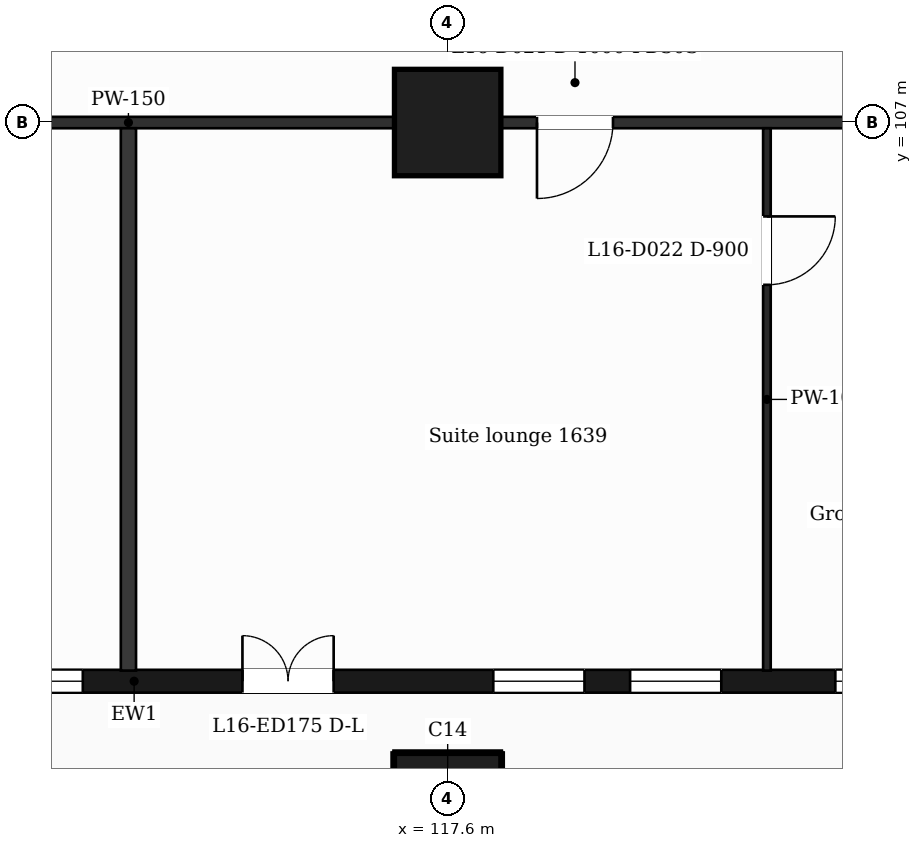
"""IFC4 building model, lengths in metres.
Left out: names, types, materials, properties, quantities, classifications, styles, units other than length and angle.
Written with IfcOpenShell. Run it as: python <this file> out.ifc"""

import sys

from ifc_helpers import new_model, si_unit, direction, frame, frame_2d, origin, origin_2d, place, context, subcontext, project, spatial, rectangle, extrude, element, fill, save


model = new_model("IFC4")
c1 = context("Model", 3, precision=1e-05, world=origin(), true_north=direction((0.0, 1.0)))
c2 = subcontext(c1, "Body", "Model", "MODEL_VIEW")
j1 = project(units=[si_unit("LENGTHUNIT", "METRE"), si_unit("PLANEANGLEUNIT", "RADIAN")], contexts=[c1])
p1 = place(None, origin())
s1 = spatial("IfcSite", under=j1, at=p1, CompositionType="ELEMENT")
p2 = place(p1, origin())
s2 = spatial("IfcBuilding", under=s1, at=p2, CompositionType="ELEMENT")
p3 = place(p2, frame((0.0, 0.0, 74.0)))
s3 = spatial("IfcBuildingStorey", under=s2, at=p3, CompositionType="ELEMENT", Elevation=74.0)
for number, where, z_axis, x_axis in (
    (1, (117.6, 98.0, 0.0), (0.0, 0.0, 1.0), (1.0, 0.0, 0.0)),
    (2, (117.6, 107.0, 0.0), (0.0, 0.0, 1.0), (1.0, 0.0, 0.0)),
):
    element("IfcColumn", number, at=place(p3, frame(where, z_axis=z_axis, x_axis=x_axis)), inside=s3, PredefinedType="COLUMN", context=c2, shape_type="SweptSolid", body=[
        extrude(rectangle(XDim=1.4, YDim=1.4, at=origin_2d()), origin(), (0.0, 0.0, 1.0), 3.5),
    ])
p4 = place(p3, frame((89.85, 99.65, 0.0), z_axis=(0.0, 0.0, 1.0), x_axis=(1.0, 0.0, 0.0)))
e3 = element("IfcWall", 3, at=p4, inside=s3, PredefinedType="SOLIDWALL", context=c2, shape_type="SweptSolid", body=[
    extrude(rectangle(XDim=47.25, YDim=0.3, at=frame_2d((23.625, 0.0))), origin(), (0.0, 0.0, 1.0), 3.18),
])
p5 = place(p4, frame((0.725, 0.0, 0.9)))
e4 = element("IfcOpeningElement", 4, at=p5, cuts=e3, PredefinedType="OPENING", context=c2, shape_type="SweptSolid", body=[
    extrude(rectangle(XDim=1.2, YDim=2.1, at=frame_2d((0.6, 1.05))), frame((0.0, 0.16, 0.0), z_axis=(0.0, -1.0, 0.0), x_axis=(1.0, 0.0, 0.0)), (0.0, 0.0, 1.0), 0.32),
])
p6 = place(p4, frame((3.45, 0.0, 0.9)))
e5 = element("IfcOpeningElement", 5, at=p6, cuts=e3, PredefinedType="OPENING", context=c2, shape_type="SweptSolid", body=[
    extrude(rectangle(XDim=2.4, YDim=2.1, at=frame_2d((1.2, 1.05))), frame((0.0, 0.16, 0.0), z_axis=(0.0, -1.0, 0.0), x_axis=(1.0, 0.0, 0.0)), (0.0, 0.0, 1.0), 0.32),
])
p7 = place(p4, frame((7.65, 0.0, 0.9)))
e6 = element("IfcOpeningElement", 6, at=p7, cuts=e3, PredefinedType="OPENING", context=c2, shape_type="SweptSolid", body=[
    extrude(rectangle(XDim=2.4, YDim=2.1, at=frame_2d((1.2, 1.05))), frame((0.0, 0.16, 0.0), z_axis=(0.0, -1.0, 0.0), x_axis=(1.0, 0.0, 0.0)), (0.0, 0.0, 1.0), 0.32),
])
p8 = place(p4, frame((12.45, 0.0, 0.9)))
e7 = element("IfcOpeningElement", 7, at=p8, cuts=e3, PredefinedType="OPENING", context=c2, shape_type="SweptSolid", body=[
    extrude(rectangle(XDim=1.2, YDim=2.1, at=frame_2d((0.6, 1.05))), frame((0.0, 0.16, 0.0), z_axis=(0.0, -1.0, 0.0), x_axis=(1.0, 0.0, 0.0)), (0.0, 0.0, 1.0), 0.32),
])
p9 = place(p4, frame((16.65, 0.0, 0.9)))
e8 = element("IfcOpeningElement", 8, at=p9, cuts=e3, PredefinedType="OPENING", context=c2, shape_type="SweptSolid", body=[
    extrude(rectangle(XDim=1.2, YDim=2.1, at=frame_2d((0.6, 1.05))), frame((0.0, 0.16, 0.0), z_axis=(0.0, -1.0, 0.0), x_axis=(1.0, 0.0, 0.0)), (0.0, 0.0, 1.0), 0.32),
])
p10 = place(p4, frame((19.95, 0.0, 0.9)))
e9 = element("IfcOpeningElement", 9, at=p10, cuts=e3, PredefinedType="OPENING", context=c2, shape_type="SweptSolid", body=[
    extrude(rectangle(XDim=1.2, YDim=2.1, at=frame_2d((0.6, 1.05))), frame((0.0, 0.16, 0.0), z_axis=(0.0, -1.0, 0.0), x_axis=(1.0, 0.0, 0.0)), (0.0, 0.0, 1.0), 0.32),
])
p11 = place(p4, frame((21.75, 0.0, 0.9)))
e10 = element("IfcOpeningElement", 10, at=p11, cuts=e3, PredefinedType="OPENING", context=c2, shape_type="SweptSolid", body=[
    extrude(rectangle(XDim=1.2, YDim=2.1, at=frame_2d((0.6, 1.05))), frame((0.0, 0.16, 0.0), z_axis=(0.0, -1.0, 0.0), x_axis=(1.0, 0.0, 0.0)), (0.0, 0.0, 1.0), 0.32),
])
p12 = place(p4, frame((25.05, 0.0, 0.0)))
e11 = element("IfcOpeningElement", 11, at=p12, cuts=e3, PredefinedType="OPENING", context=c2, shape_type="SweptSolid", body=[
    extrude(rectangle(XDim=1.2, YDim=2.4, at=frame_2d((0.6, 1.2))), frame((0.0, 0.16, 0.0), z_axis=(0.0, -1.0, 0.0), x_axis=(1.0, 0.0, 0.0)), (0.0, 0.0, 1.0), 0.32),
])
p13 = place(p4, frame((28.35, 0.0, 0.9)))
e12 = element("IfcOpeningElement", 12, at=p13, cuts=e3, PredefinedType="OPENING", context=c2, shape_type="SweptSolid", body=[
    extrude(rectangle(XDim=1.2, YDim=2.1, at=frame_2d((0.6, 1.05))), frame((0.0, 0.16, 0.0), z_axis=(0.0, -1.0, 0.0), x_axis=(1.0, 0.0, 0.0)), (0.0, 0.0, 1.0), 0.32),
])
p14 = place(p4, frame((30.15, 0.0, 0.9)))
e13 = element("IfcOpeningElement", 13, at=p14, cuts=e3, PredefinedType="OPENING", context=c2, shape_type="SweptSolid", body=[
    extrude(rectangle(XDim=1.2, YDim=2.1, at=frame_2d((0.6, 1.05))), frame((0.0, 0.16, 0.0), z_axis=(0.0, -1.0, 0.0), x_axis=(1.0, 0.0, 0.0)), (0.0, 0.0, 1.0), 0.32),
])
p15 = place(p4, frame((32.85, 0.0, 0.9)))
e14 = element("IfcOpeningElement", 14, at=p15, cuts=e3, PredefinedType="OPENING", context=c2, shape_type="SweptSolid", body=[
    extrude(rectangle(XDim=2.4, YDim=2.1, at=frame_2d((1.2, 1.05))), frame((0.0, 0.16, 0.0), z_axis=(0.0, -1.0, 0.0), x_axis=(1.0, 0.0, 0.0)), (0.0, 0.0, 1.0), 0.32),
])
p16 = place(p4, frame((37.05, 0.0, 0.9)))
e15 = element("IfcOpeningElement", 15, at=p16, cuts=e3, PredefinedType="OPENING", context=c2, shape_type="SweptSolid", body=[
    extrude(rectangle(XDim=2.4, YDim=2.1, at=frame_2d((1.2, 1.05))), frame((0.0, 0.16, 0.0), z_axis=(0.0, -1.0, 0.0), x_axis=(1.0, 0.0, 0.0)), (0.0, 0.0, 1.0), 0.32),
])
p17 = place(p4, frame((41.85, 0.0, 0.9)))
e16 = element("IfcOpeningElement", 16, at=p17, cuts=e3, PredefinedType="OPENING", context=c2, shape_type="SweptSolid", body=[
    extrude(rectangle(XDim=1.2, YDim=2.1, at=frame_2d((0.6, 1.05))), frame((0.0, 0.16, 0.0), z_axis=(0.0, -1.0, 0.0), x_axis=(1.0, 0.0, 0.0)), (0.0, 0.0, 1.0), 0.32),
])
p18 = place(p4, frame((45.25, 0.0, 0.9)))
e17 = element("IfcOpeningElement", 17, at=p18, cuts=e3, PredefinedType="OPENING", context=c2, shape_type="SweptSolid", body=[
    extrude(rectangle(XDim=1.2, YDim=2.1, at=frame_2d((0.6, 1.05))), frame((0.0, 0.16, 0.0), z_axis=(0.0, -1.0, 0.0), x_axis=(1.0, 0.0, 0.0)), (0.0, 0.0, 1.0), 0.32),
])
p19 = place(p3, frame((87.018, 107.0, 0.0), z_axis=(0.0, 0.0, 1.0), x_axis=(1.0, 0.0, 0.0)))
e18 = element("IfcWall", 18, at=p19, inside=s3, PredefinedType="PARTITIONING", context=c2, shape_type="SweptSolid", body=[
    extrude(rectangle(XDim=52.765, YDim=0.15, at=frame_2d((26.382, 0.0))), origin(), (0.0, 0.0, 1.0), 3.18),
])
p20 = place(p19, frame((1.276, 0.0, 0.0)))
e19 = element("IfcOpeningElement", 19, at=p20, cuts=e18, PredefinedType="OPENING", context=c2, shape_type="SweptSolid", body=[
    extrude(rectangle(XDim=0.95, YDim=2.1, at=frame_2d((0.475, 1.05))), frame((0.0, 0.085, 0.0), z_axis=(0.0, -1.0, 0.0), x_axis=(1.0, 0.0, 0.0)), (0.0, 0.0, 1.0), 0.17),
])
p21 = place(p19, frame((10.757, 0.0, 0.0)))
e20 = element("IfcOpeningElement", 20, at=p21, cuts=e18, PredefinedType="OPENING", context=c2, shape_type="SweptSolid", body=[
    extrude(rectangle(XDim=1.0, YDim=2.1, at=frame_2d((0.5, 1.05))), frame((0.0, 0.085, 0.0), z_axis=(0.0, -1.0, 0.0), x_axis=(1.0, 0.0, 0.0)), (0.0, 0.0, 1.0), 0.17),
])
p22 = place(p19, frame((23.125, 0.0, 0.0)))
e21 = element("IfcOpeningElement", 21, at=p22, cuts=e18, PredefinedType="OPENING", context=c2, shape_type="SweptSolid", body=[
    extrude(rectangle(XDim=0.95, YDim=2.1, at=frame_2d((0.475, 1.05))), frame((0.0, 0.085, 0.0), z_axis=(0.0, -1.0, 0.0), x_axis=(1.0, 0.0, 0.0)), (0.0, 0.0, 1.0), 0.17),
])
p23 = place(p19, frame((31.757, 0.0, 0.0)))
e22 = element("IfcOpeningElement", 22, at=p23, cuts=e18, PredefinedType="OPENING", context=c2, shape_type="SweptSolid", body=[
    extrude(rectangle(XDim=1.0, YDim=2.1, at=frame_2d((0.5, 1.05))), frame((0.0, 0.085, 0.0), z_axis=(0.0, -1.0, 0.0), x_axis=(1.0, 0.0, 0.0)), (0.0, 0.0, 1.0), 0.17),
])
p24 = place(p19, frame((42.819, 0.0, 0.0)))
e23 = element("IfcOpeningElement", 23, at=p24, cuts=e18, PredefinedType="OPENING", context=c2, shape_type="SweptSolid", body=[
    extrude(rectangle(XDim=0.95, YDim=2.1, at=frame_2d((0.475, 1.05))), frame((0.0, 0.085, 0.0), z_axis=(0.0, -1.0, 0.0), x_axis=(1.0, 0.0, 0.0)), (0.0, 0.0, 1.0), 0.17),
])
p25 = place(p19, frame((48.974, 0.0, 0.0)))
e24 = element("IfcOpeningElement", 24, at=p25, cuts=e18, PredefinedType="OPENING", context=c2, shape_type="SweptSolid", body=[
    extrude(rectangle(XDim=0.95, YDim=2.1, at=frame_2d((0.475, 1.05))), frame((0.0, 0.085, 0.0), z_axis=(0.0, -1.0, 0.0), x_axis=(1.0, 0.0, 0.0)), (0.0, 0.0, 1.0), 0.17),
])
p26 = place(p3, frame((113.4, 99.79, 0.0), z_axis=(0.0, 0.0, 1.0), x_axis=(0.0, 1.0, 0.0)))
e25 = element("IfcWall", 25, at=p26, inside=s3, PredefinedType="PARTITIONING", context=c2, shape_type="SweptSolid", body=[
    extrude(rectangle(XDim=7.135, YDim=0.2, at=frame_2d((3.567, 0.0))), origin(), (0.0, 0.0, 1.0), 3.18),
])
p27 = place(p3, frame((121.8, 99.79, 0.0), z_axis=(0.0, 0.0, 1.0), x_axis=(0.0, 1.0, 0.0)))
e26 = element("IfcWall", 26, at=p27, inside=s3, PredefinedType="PARTITIONING", context=c2, shape_type="SweptSolid", body=[
    extrude(rectangle(XDim=7.135, YDim=0.1, at=frame_2d((3.567, 0.0))), origin(), (0.0, 0.0, 1.0), 3.18),
])
p28 = place(p27, frame((5.075, 0.0, 0.0)))
e27 = element("IfcOpeningElement", 27, at=p28, cuts=e26, PredefinedType="OPENING", context=c2, shape_type="SweptSolid", body=[
    extrude(rectangle(XDim=0.9, YDim=2.1, at=frame_2d((0.45, 1.05))), frame((0.0, 0.06, 0.0), z_axis=(0.0, -1.0, 0.0), x_axis=(1.0, 0.0, 0.0)), (0.0, 0.0, 1.0), 0.12),
])
p29 = place(p11, origin())
e28 = element("IfcWindow", 28, at=p29, inside=s3, PartitioningType="SINGLE_PANEL", PredefinedType="WINDOW", context=c2, shape_type="SweptSolid", body=[
    extrude(rectangle(XDim=1.2, YDim=2.1, at=frame_2d((0.6, 1.05))), frame((0.0, 0.03, 0.0), z_axis=(0.0, -1.0, 0.0), x_axis=(1.0, 0.0, 0.0)), (0.0, 0.0, 1.0), 0.06),
])
fill(e10, e28)
p30 = place(p12, origin())
e29 = element("IfcDoor", 29, at=p30, inside=s3, OperationType="DOUBLE_DOOR_SINGLE_SWING", PredefinedType="DOOR", context=c2, shape_type="SweptSolid", body=[
    extrude(rectangle(XDim=1.2, YDim=2.4, at=frame_2d((0.6, 1.2))), frame((0.0, 0.025, 0.0), z_axis=(0.0, -1.0, 0.0), x_axis=(1.0, 0.0, 0.0)), (0.0, 0.0, 1.0), 0.05),
])
fill(e11, e29)
p31 = place(p13, origin())
e30 = element("IfcWindow", 30, at=p31, inside=s3, PartitioningType="SINGLE_PANEL", PredefinedType="WINDOW", context=c2, shape_type="SweptSolid", body=[
    extrude(rectangle(XDim=1.2, YDim=2.1, at=frame_2d((0.6, 1.05))), frame((0.0, 0.03, 0.0), z_axis=(0.0, -1.0, 0.0), x_axis=(1.0, 0.0, 0.0)), (0.0, 0.0, 1.0), 0.06),
])
fill(e12, e30)
p32 = place(p14, origin())
e31 = element("IfcWindow", 31, at=p32, inside=s3, PartitioningType="SINGLE_PANEL", PredefinedType="WINDOW", context=c2, shape_type="SweptSolid", body=[
    extrude(rectangle(XDim=1.2, YDim=2.1, at=frame_2d((0.6, 1.05))), frame((0.0, 0.03, 0.0), z_axis=(0.0, -1.0, 0.0), x_axis=(1.0, 0.0, 0.0)), (0.0, 0.0, 1.0), 0.06),
])
fill(e13, e31)
p33 = place(p15, origin())
e32 = element("IfcWindow", 32, at=p33, inside=s3, PartitioningType="SINGLE_PANEL", PredefinedType="WINDOW", context=c2, shape_type="SweptSolid", body=[
    extrude(rectangle(XDim=2.4, YDim=2.1, at=frame_2d((1.2, 1.05))), frame((0.0, 0.03, 0.0), z_axis=(0.0, -1.0, 0.0), x_axis=(1.0, 0.0, 0.0)), (0.0, 0.0, 1.0), 0.06),
])
fill(e14, e32)
p34 = place(p23, origin())
e33 = element("IfcDoor", 33, at=p34, inside=s3, OperationType="SINGLE_SWING_LEFT", PredefinedType="DOOR", context=c2, shape_type="SweptSolid", body=[
    extrude(rectangle(XDim=1.0, YDim=2.1, at=frame_2d((0.5, 1.05))), frame((0.0, 0.025, 0.0), z_axis=(0.0, -1.0, 0.0), x_axis=(1.0, 0.0, 0.0)), (0.0, 0.0, 1.0), 0.05),
])
fill(e22, e33)
p35 = place(p28, origin())
e34 = element("IfcDoor", 34, at=p35, inside=s3, OperationType="SINGLE_SWING_RIGHT", PredefinedType="DOOR", context=c2, shape_type="SweptSolid", body=[
    extrude(rectangle(XDim=0.9, YDim=2.1, at=frame_2d((0.45, 1.05))), frame((0.0, 0.025, 0.0), z_axis=(0.0, -1.0, 0.0), x_axis=(1.0, 0.0, 0.0)), (0.0, 0.0, 1.0), 0.05),
])
fill(e27, e34)
save(model, sys.argv[1])
